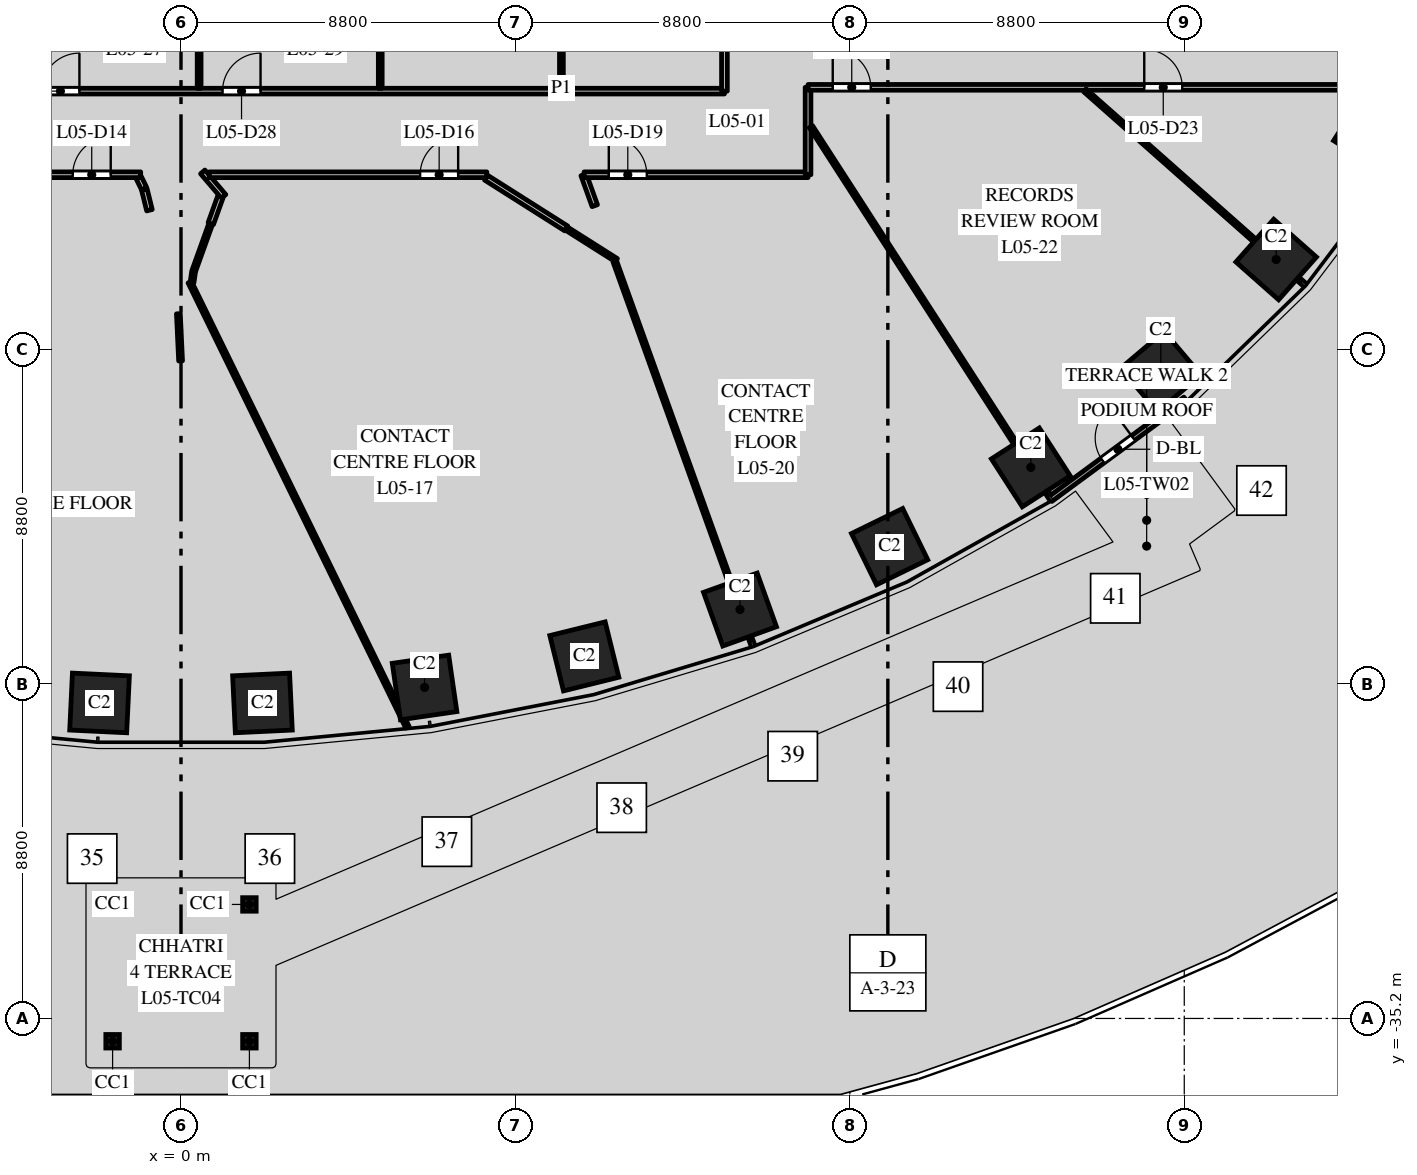
"""IFC4 building model, lengths in metres.
Left out: names, types, materials, properties, quantities, classifications, styles, units other than length and angle.
Written with IfcOpenShell. Run it as: python <this file> out.ifc"""

import sys

from ifc_helpers import new_model, si_unit, direction, frame, frame_2d, origin, origin_2d, place, context, subcontext, project, spatial, rectangle, hollow_circle, extrude, element, fill, save


model = new_model("IFC4")
c1 = context("Model", 3, precision=1e-05, world=origin(), true_north=direction((0.0, 1.0)))
c2 = subcontext(c1, "Body", "Model", "MODEL_VIEW")
j1 = project(units=[si_unit("LENGTHUNIT", "METRE"), si_unit("PLANEANGLEUNIT", "RADIAN")], contexts=[c1])
p1 = place(None, origin())
s1 = spatial("IfcSite", under=j1, at=p1, CompositionType="ELEMENT")
p2 = place(p1, origin())
s2 = spatial("IfcBuilding", under=s1, at=p2, CompositionType="ELEMENT")
p3 = place(p2, frame((0.0, 0.0, 30.5)))
s3 = spatial("IfcBuildingStorey", under=s2, at=p3, CompositionType="ELEMENT", Elevation=30.5)
for number, where, z_axis, x_axis in (
    (1, (-2.143, -26.898, 0.0), (0.0, 0.0, 1.0), (0.999, -0.048, 0.0)),
    (2, (2.143, -26.898, 0.0), (0.0, 0.0, 1.0), (0.999, 0.048, 0.0)),
    (3, (6.409, -26.491, 0.0), (0.0, 0.0, 1.0), (0.99, 0.143, 0.0)),
    (4, (10.613, -25.674, 0.0), (0.0, 0.0, 1.0), (0.971, 0.24, 0.0)),
    (5, (14.709, -24.441, 0.0), (0.0, 0.0, 1.0), (0.941, 0.338, 0.0)),
    (6, (18.646, -22.785, 0.0), (0.0, 0.0, 1.0), (0.898, 0.439, 0.0)),
    (7, (22.362, -20.7, 0.0), (0.0, 0.0, 1.0), (0.84, 0.542, 0.0)),
    (8, (25.783, -18.18, 0.0), (0.0, 0.0, 1.0), (0.763, 0.646, 0.0)),
    (9, (28.819, -15.23, 0.0), (0.0, 0.0, 1.0), (0.663, 0.749, 0.0)),
    (10, (31.365, -11.871, 0.0), (0.0, 0.0, 1.0), (0.535, 0.845, 0.0)),
):
    element("IfcColumn", number, at=place(p3, frame(where, z_axis=z_axis, x_axis=x_axis)), inside=s3, PredefinedType="COLUMN", context=c2, shape_type="SweptSolid", body=[
        extrude(rectangle(XDim=1.5, YDim=1.5, at=origin_2d()), origin(), (0.0, 0.0, 1.0), 4.0),
    ])
p4 = place(p3, frame((22.872, -21.535, 0.0), z_axis=(0.0, 0.0, 1.0), x_axis=(0.805154287598, 0.593065403782, 0.0)))
e11 = element("IfcWall", 11, at=p4, inside=s3, PredefinedType="STANDARD", context=c2, shape_type="SweptSolid", body=[
    extrude(rectangle(XDim=4.425, YDim=0.15, at=frame_2d((2.212, 0.0))), origin(), (0.0, 0.0, 1.0), 3.7),
])
p5 = place(p4, frame((1.712, 0.0, 0.0)))
e12 = element("IfcOpeningElement", 12, at=p5, cuts=e11, PredefinedType="OPENING", context=c2, shape_type="SweptSolid", body=[
    extrude(rectangle(XDim=1.0, YDim=2.4, at=frame_2d((0.5, 1.2))), frame((0.0, 0.085, 0.0), z_axis=(0.0, -1.0, 0.0), x_axis=(1.0, 0.0, 0.0)), (0.0, 0.0, 1.0), 0.17),
])
for number, where, z_axis, x_axis in (
    (13, (-1.8, -35.8, 0.45), (0.0, 0.0, 1.0), (1.0, 0.0, 0.0)),
    (14, (1.8, -35.8, 0.45), (0.0, 0.0, 1.0), (1.0, 0.0, 0.0)),
    (15, (1.8, -32.2, 0.45), (0.0, 0.0, 1.0), (1.0, 0.0, 0.0)),
    (16, (-1.8, -32.2, 0.45), (0.0, 0.0, 1.0), (1.0, 0.0, 0.0)),
):
    element("IfcColumn", number, at=place(p3, frame(where, z_axis=z_axis, x_axis=x_axis)), inside=s3, PredefinedType="COLUMN", context=c2, shape_type="SweptSolid", body=[
        extrude(hollow_circle(Radius=0.178, WallThickness=0.016, at=origin_2d()), origin(), (0.0, 0.0, 1.0), 3.55),
    ])
p6 = place(p3, frame((-14.3, -10.8, 0.0), z_axis=(0.0, 0.0, 1.0), x_axis=(1.0, 0.0, 0.0)))
e17 = element("IfcWall", 17, at=p6, inside=s3, PredefinedType="PARTITIONING", context=c2, shape_type="SweptSolid", body=[
    extrude(rectangle(XDim=28.6, YDim=0.15, at=frame_2d((14.3, 0.0))), origin(), (0.0, 0.0, 1.0), 2.85),
])
p7 = place(p6, frame((10.627, 0.0, 0.0)))
e18 = element("IfcOpeningElement", 18, at=p7, cuts=e17, PredefinedType="OPENING", context=c2, shape_type="SweptSolid", body=[
    extrude(rectangle(XDim=1.0, YDim=2.1, at=frame_2d((0.5, 1.05))), frame((0.0, 0.085, 0.0), z_axis=(0.0, -1.0, 0.0), x_axis=(1.0, 0.0, 0.0)), (0.0, 0.0, 1.0), 0.17),
])
p8 = place(p6, frame((15.393, 0.0, 0.0)))
e19 = element("IfcOpeningElement", 19, at=p8, cuts=e17, PredefinedType="OPENING", context=c2, shape_type="SweptSolid", body=[
    extrude(rectangle(XDim=1.0, YDim=2.1, at=frame_2d((0.5, 1.05))), frame((0.0, 0.085, 0.0), z_axis=(0.0, -1.0, 0.0), x_axis=(1.0, 0.0, 0.0)), (0.0, 0.0, 1.0), 0.17),
])
p9 = place(p3, frame((-7.483, -13.0, 0.0), z_axis=(0.0, 0.0, 1.0), x_axis=(1.0, 0.0, 0.0)))
e20 = element("IfcWall", 20, at=p9, inside=s3, PredefinedType="PARTITIONING", context=c2, shape_type="SweptSolid", body=[
    extrude(rectangle(XDim=6.422, YDim=0.15, at=frame_2d((3.211, 0.0))), origin(), (0.0, 0.0, 1.0), 2.85),
])
p10 = place(p9, frame((4.634, 0.0, 0.0)))
e21 = element("IfcOpeningElement", 21, at=p10, cuts=e20, PredefinedType="OPENING", context=c2, shape_type="SweptSolid", body=[
    extrude(rectangle(XDim=1.0, YDim=2.1, at=frame_2d((0.5, 1.05))), frame((0.0, 0.085, 0.0), z_axis=(0.0, -1.0, 0.0), x_axis=(1.0, 0.0, 0.0)), (0.0, 0.0, 1.0), 0.17),
])
p11 = place(p3, frame((-1.111, -13.079, 0.0), z_axis=(0.0, 0.0, 1.0), x_axis=(0.440240923942, -0.897879685084, 0.0)))
e22 = element("IfcWall", 22, at=p11, inside=s3, PredefinedType="PARTITIONING", context=c2, shape_type="SweptSolid", body=[
    extrude(rectangle(XDim=0.323, YDim=0.15, at=frame_2d((0.161, 0.0))), origin(), (0.0, 0.0, 1.0), 2.85),
])
p12 = place(p3, frame((-0.965, -13.386, 0.0), z_axis=(0.0, 0.0, 1.0), x_axis=(0.239578315167, -0.970877042113, 0.0)))
e23 = element("IfcWall", 23, at=p12, inside=s3, PredefinedType="PARTITIONING", context=c2, shape_type="SweptSolid", body=[
    extrude(rectangle(XDim=0.563, YDim=0.15, at=frame_2d((0.282, 0.0))), origin(), (0.0, 0.0, 1.0), 2.85),
])
p13 = place(p3, frame((-0.069, -16.658, 0.0), z_axis=(0.0, 0.0, 1.0), x_axis=(0.047263912187, -0.998882436829, 0.0)))
e24 = element("IfcWall", 24, at=p13, inside=s3, PredefinedType="PARTITIONING", context=c2, shape_type="SweptSolid", body=[
    extrude(rectangle(XDim=0.424, YDim=0.1, at=frame_2d((0.212, 0.0))), origin(), (0.0, 0.0, 1.0), 3.7),
])
p14 = place(p3, frame((-0.048, -17.108, 0.0), z_axis=(0.0, 0.0, 1.0), x_axis=(0.046977779105, -0.998895934655, 0.0)))
e25 = element("IfcWall", 25, at=p14, inside=s3, PredefinedType="PARTITIONING", context=c2, shape_type="SweptSolid", body=[
    extrude(rectangle(XDim=0.79, YDim=0.1, at=frame_2d((0.395, 0.0))), origin(), (0.0, 0.0, 1.0), 3.7),
])
p15 = place(p3, frame((0.231, -15.824, 0.0), z_axis=(0.0, 0.0, 1.0), x_axis=(0.439219534853, -0.89837976391, 0.0)))
e26 = element("IfcWall", 26, at=p15, inside=s3, PredefinedType="PARTITIONING", context=c2, shape_type="SweptSolid", body=[
    extrude(rectangle(XDim=13.039, YDim=0.1, at=frame_2d((6.52, 0.0))), origin(), (0.0, 0.0, 1.0), 2.85),
])
p16 = place(p3, frame((0.291, -15.832, 0.0), z_axis=(0.0, 0.0, 1.0), x_axis=(0.141883286424, 0.989883393655, 0.0)))
e27 = element("IfcWall", 27, at=p16, inside=s3, PredefinedType="PARTITIONING", context=c2, shape_type="SweptSolid", body=[
    extrude(rectangle(XDim=0.296, YDim=0.1, at=frame_2d((0.148, 0.0))), origin(), (0.0, 0.0, 1.0), 3.7),
])
p17 = place(p3, frame((0.34, -15.521, 0.0), z_axis=(0.0, 0.0, 1.0), x_axis=(0.338162451205, 0.941087751804, 0.0)))
e28 = element("IfcWall", 28, at=p17, inside=s3, PredefinedType="PARTITIONING", context=c2, shape_type="SweptSolid", body=[
    extrude(rectangle(XDim=1.304, YDim=0.1, at=frame_2d((0.652, 0.0))), origin(), (0.0, 0.0, 1.0), 3.7),
])
p18 = place(p3, frame((0.477, -10.725, 0.0), z_axis=(0.0, 0.0, 1.0), x_axis=(0.0, 1.0, 0.0)))
e29 = element("IfcWall", 29, at=p18, inside=s3, PredefinedType="PARTITIONING", context=c2, shape_type="SweptSolid", body=[
    extrude(rectangle(XDim=3.257, YDim=0.1, at=frame_2d((1.628, 0.0))), origin(), (0.0, 0.0, 1.0), 2.85),
])
p19 = place(p3, frame((0.572, -12.925, 0.0), z_axis=(0.0, 0.0, 1.0), x_axis=(0.648868148451, -0.760900864717, 0.0)))
e30 = element("IfcWall", 30, at=p19, inside=s3, PredefinedType="PARTITIONING", context=c2, shape_type="SweptSolid", body=[
    extrude(rectangle(XDim=0.848, YDim=0.15, at=frame_2d((0.424, 0.0))), origin(), (0.0, 0.0, 1.0), 3.7),
])
p20 = place(p3, frame((0.742, -13.0, 0.0), z_axis=(0.0, 0.0, 1.0), x_axis=(1.0, 0.0, 0.0)))
e31 = element("IfcWall", 31, at=p20, inside=s3, PredefinedType="PARTITIONING", context=c2, shape_type="SweptSolid", body=[
    extrude(rectangle(XDim=7.305, YDim=0.15, at=frame_2d((3.653, 0.0))), origin(), (0.0, 0.0, 1.0), 2.85),
])
p21 = place(p20, frame((5.551, 0.0, 0.0)))
e32 = element("IfcOpeningElement", 32, at=p21, cuts=e31, PredefinedType="OPENING", context=c2, shape_type="SweptSolid", body=[
    extrude(rectangle(XDim=1.0, YDim=2.1, at=frame_2d((0.5, 1.05))), frame((0.0, 0.085, 0.0), z_axis=(0.0, -1.0, 0.0), x_axis=(1.0, 0.0, 0.0)), (0.0, 0.0, 1.0), 0.17),
])
p22 = place(p3, frame((0.784, -14.285, 0.0), z_axis=(0.0, 0.0, 1.0), x_axis=(0.337939421495, 0.941167863561, 0.0)))
e33 = element("IfcWall", 33, at=p22, inside=s3, PredefinedType="PARTITIONING", context=c2, shape_type="SweptSolid", body=[
    extrude(rectangle(XDim=0.743, YDim=0.15, at=frame_2d((0.371, 0.0))), origin(), (0.0, 0.0, 1.0), 3.7),
])
p23 = place(p3, frame((5.243, -10.725, 0.0), z_axis=(0.0, 0.0, 1.0), x_axis=(0.0, 1.0, 0.0)))
e34 = element("IfcWall", 34, at=p23, inside=s3, PredefinedType="PARTITIONING", context=c2, shape_type="SweptSolid", body=[
    extrude(rectangle(XDim=4.666, YDim=0.1, at=frame_2d((2.333, 0.0))), origin(), (0.0, 0.0, 1.0), 2.85),
])
p24 = place(p3, frame((8.028, -13.077, 0.0), z_axis=(0.0, 0.0, 1.0), x_axis=(0.844718865656, -0.53521027457, 0.0)))
e35 = element("IfcWall", 35, at=p24, inside=s3, PredefinedType="PARTITIONING", context=c2, shape_type="SweptSolid", body=[
    extrude(rectangle(XDim=2.497, YDim=0.15, at=frame_2d((1.248, 0.0))), origin(), (0.0, 0.0, 1.0), 3.7),
])
p25 = place(p3, frame((10.01, -10.725, 0.0), z_axis=(0.0, 0.0, 1.0), x_axis=(0.0, 1.0, 0.0)))
e36 = element("IfcWall", 36, at=p25, inside=s3, PredefinedType="PARTITIONING", context=c2, shape_type="SweptSolid", body=[
    extrude(rectangle(XDim=21.45, YDim=0.1, at=frame_2d((10.725, 0.0))), origin(), (0.0, 0.0, 1.0), 2.75),
])
p26 = place(p3, frame((10.137, -14.413, 0.0), z_axis=(0.0, 0.0, 1.0), x_axis=(0.844849680057, -0.535003755228, 0.0)))
e37 = element("IfcWall", 37, at=p26, inside=s3, PredefinedType="PARTITIONING", context=c2, shape_type="SweptSolid", body=[
    extrude(rectangle(XDim=1.562, YDim=0.1, at=frame_2d((0.781, 0.0))), origin(), (0.0, 0.0, 1.0), 3.7),
])
p27 = place(p3, frame((10.595, -13.0, 0.0), z_axis=(0.0, 0.0, 1.0), x_axis=(0.338659506624, -0.940908995904, 0.0)))
e38 = element("IfcWall", 38, at=p27, inside=s3, PredefinedType="PARTITIONING", context=c2, shape_type="SweptSolid", body=[
    extrude(rectangle(XDim=0.865, YDim=0.15, at=frame_2d((0.433, 0.0))), origin(), (0.0, 0.0, 1.0), 3.7),
])
p28 = place(p3, frame((10.607, -13.0, 0.0), z_axis=(0.0, 0.0, 1.0), x_axis=(1.0, 0.0, 0.0)))
e39 = element("IfcWall", 39, at=p28, inside=s3, PredefinedType="PARTITIONING", context=c2, shape_type="SweptSolid", body=[
    extrude(rectangle(XDim=5.893, YDim=0.15, at=frame_2d((2.947, 0.0))), origin(), (0.0, 0.0, 1.0), 3.7),
])
p29 = place(p28, frame((0.65, 0.0, 0.0)))
e40 = element("IfcOpeningElement", 40, at=p29, cuts=e39, PredefinedType="OPENING", context=c2, shape_type="SweptSolid", body=[
    extrude(rectangle(XDim=1.0, YDim=2.1, at=frame_2d((0.5, 1.05))), frame((0.0, 0.085, 0.0), z_axis=(0.0, -1.0, 0.0), x_axis=(1.0, 0.0, 0.0)), (0.0, 0.0, 1.0), 0.17),
])
p30 = place(p3, frame((11.416, -15.282, 0.0), z_axis=(0.0, 0.0, 1.0), x_axis=(0.338364268616, -0.94101520802, 0.0)))
e41 = element("IfcWall", 41, at=p30, inside=s3, PredefinedType="PARTITIONING", context=c2, shape_type="SweptSolid", body=[
    extrude(rectangle(XDim=10.734, YDim=0.1, at=frame_2d((5.367, 0.0))), origin(), (0.0, 0.0, 1.0), 3.7),
])
p31 = place(p3, frame((14.3, -10.8, 0.0), z_axis=(0.0, 0.0, 1.0), x_axis=(0.0, 1.0, 0.0)))
e42 = element("IfcWall", 42, at=p31, inside=s3, PredefinedType="PARTITIONING", context=c2, shape_type="SweptSolid", body=[
    extrude(rectangle(XDim=21.6, YDim=0.15, at=frame_2d((10.8, 0.0))), origin(), (0.0, 0.0, 1.0), 2.75),
])
p32 = place(p31, frame((19.95, 0.0, 0.0)))
e43 = element("IfcOpeningElement", 43, at=p32, cuts=e42, PredefinedType="OPENING", context=c2, shape_type="SweptSolid", body=[
    extrude(rectangle(XDim=1.0, YDim=2.1, at=frame_2d((0.5, 1.05))), frame((0.0, 0.085, 0.0), z_axis=(0.0, -1.0, 0.0), x_axis=(1.0, 0.0, 0.0)), (0.0, 0.0, 1.0), 0.17),
])
p33 = place(p3, frame((16.5, -13.0, 0.0), z_axis=(0.0, 0.0, 1.0), x_axis=(0.0, 1.0, 0.0)))
e44 = element("IfcWall", 44, at=p33, inside=s3, PredefinedType="PARTITIONING", context=c2, shape_type="SweptSolid", body=[
    extrude(rectangle(XDim=2.3, YDim=0.15, at=frame_2d((1.15, 0.0))), origin(), (0.0, 0.0, 1.0), 3.7),
])
p34 = place(p3, frame((16.575, -11.733, 0.0), z_axis=(0.0, 0.0, 1.0), x_axis=(0.54222594427, -0.840232720953, 0.0)))
e45 = element("IfcWall", 45, at=p34, inside=s3, PredefinedType="PARTITIONING", context=c2, shape_type="SweptSolid", body=[
    extrude(rectangle(XDim=11.674, YDim=0.1, at=frame_2d((5.837, 0.0))), origin(), (0.0, 0.0, 1.0), 3.7),
])
p35 = place(p3, frame((16.5, -10.7, 0.0), z_axis=(0.0, 0.0, 1.0), x_axis=(1.0, 0.0, 0.0)))
e46 = element("IfcWall", 46, at=p35, inside=s3, PredefinedType="PARTITIONING", context=c2, shape_type="SweptSolid", body=[
    extrude(rectangle(XDim=15.0, YDim=0.15, at=frame_2d((7.5, 0.0))), origin(), (0.0, 0.0, 1.0), 2.75),
])
p36 = place(p35, frame((0.65, 0.0, 0.0)))
e47 = element("IfcOpeningElement", 47, at=p36, cuts=e46, PredefinedType="OPENING", context=c2, shape_type="SweptSolid", body=[
    extrude(rectangle(XDim=1.0, YDim=2.1, at=frame_2d((0.5, 1.05))), frame((0.0, 0.085, 0.0), z_axis=(0.0, -1.0, 0.0), x_axis=(1.0, 0.0, 0.0)), (0.0, 0.0, 1.0), 0.17),
])
p37 = place(p35, frame((8.847, 0.0, 0.0)))
e48 = element("IfcOpeningElement", 48, at=p37, cuts=e46, PredefinedType="OPENING", context=c2, shape_type="SweptSolid", body=[
    extrude(rectangle(XDim=1.0, YDim=2.1, at=frame_2d((0.5, 1.05))), frame((0.0, 0.085, 0.0), z_axis=(0.0, -1.0, 0.0), x_axis=(1.0, 0.0, 0.0)), (0.0, 0.0, 1.0), 0.17),
])
p38 = place(p3, frame((23.785, -10.778, 0.0), z_axis=(0.0, 0.0, 1.0), x_axis=(0.748985701008, -0.662586160198, 0.0)))
e49 = element("IfcWall", 49, at=p38, inside=s3, PredefinedType="PARTITIONING", context=c2, shape_type="SweptSolid", body=[
    extrude(rectangle(XDim=7.723, YDim=0.1, at=frame_2d((3.861, 0.0))), origin(), (0.0, 0.0, 1.0), 3.7),
])
p39 = place(p5, origin())
e50 = element("IfcDoor", 50, at=p39, inside=s3, OperationType="SINGLE_SWING_RIGHT", PredefinedType="DOOR", context=c2, shape_type="SweptSolid", body=[
    extrude(rectangle(XDim=1.0, YDim=2.4, at=frame_2d((0.5, 1.2))), frame((0.0, 0.025, 0.0), z_axis=(0.0, -1.0, 0.0), x_axis=(1.0, 0.0, 0.0)), (0.0, 0.0, 1.0), 0.05),
])
fill(e12, e50)
p40 = place(p10, origin())
e51 = element("IfcDoor", 51, at=p40, inside=s3, OperationType="SINGLE_SWING_RIGHT", PredefinedType="DOOR", context=c2, shape_type="SweptSolid", body=[
    extrude(rectangle(XDim=1.0, YDim=2.1, at=frame_2d((0.5, 1.05))), frame((0.0, 0.025, 0.0), z_axis=(0.0, -1.0, 0.0), x_axis=(1.0, 0.0, 0.0)), (0.0, 0.0, 1.0), 0.05),
])
fill(e21, e51)
p41 = place(p21, origin())
e52 = element("IfcDoor", 52, at=p41, inside=s3, OperationType="SINGLE_SWING_RIGHT", PredefinedType="DOOR", context=c2, shape_type="SweptSolid", body=[
    extrude(rectangle(XDim=1.0, YDim=2.1, at=frame_2d((0.5, 1.05))), frame((0.0, 0.025, 0.0), z_axis=(0.0, -1.0, 0.0), x_axis=(1.0, 0.0, 0.0)), (0.0, 0.0, 1.0), 0.05),
])
fill(e32, e52)
p42 = place(p29, origin())
e53 = element("IfcDoor", 53, at=p42, inside=s3, OperationType="SINGLE_SWING_LEFT", PredefinedType="DOOR", context=c2, shape_type="SweptSolid", body=[
    extrude(rectangle(XDim=1.0, YDim=2.1, at=frame_2d((0.5, 1.05))), frame((0.0, 0.025, 0.0), z_axis=(0.0, -1.0, 0.0), x_axis=(1.0, 0.0, 0.0)), (0.0, 0.0, 1.0), 0.05),
])
fill(e40, e53)
p43 = place(p36, origin())
e54 = element("IfcDoor", 54, at=p43, inside=s3, OperationType="SINGLE_SWING_LEFT", PredefinedType="DOOR", context=c2, shape_type="SweptSolid", body=[
    extrude(rectangle(XDim=1.0, YDim=2.1, at=frame_2d((0.5, 1.05))), frame((0.0, 0.025, 0.0), z_axis=(0.0, -1.0, 0.0), x_axis=(1.0, 0.0, 0.0)), (0.0, 0.0, 1.0), 0.05),
])
fill(e47, e54)
p44 = place(p37, origin())
e55 = element("IfcDoor", 55, at=p44, inside=s3, OperationType="SINGLE_SWING_LEFT", PredefinedType="DOOR", context=c2, shape_type="SweptSolid", body=[
    extrude(rectangle(XDim=1.0, YDim=2.1, at=frame_2d((0.5, 1.05))), frame((0.0, 0.025, 0.0), z_axis=(0.0, -1.0, 0.0), x_axis=(1.0, 0.0, 0.0)), (0.0, 0.0, 1.0), 0.05),
])
fill(e48, e55)
p45 = place(p7, origin())
e56 = element("IfcDoor", 56, at=p45, inside=s3, OperationType="SINGLE_SWING_RIGHT", PredefinedType="DOOR", context=c2, shape_type="SweptSolid", body=[
    extrude(rectangle(XDim=1.0, YDim=2.1, at=frame_2d((0.5, 1.05))), frame((0.0, 0.025, 0.0), z_axis=(0.0, -1.0, 0.0), x_axis=(1.0, 0.0, 0.0)), (0.0, 0.0, 1.0), 0.05),
])
fill(e18, e56)
p46 = place(p8, origin())
e57 = element("IfcDoor", 57, at=p46, inside=s3, OperationType="SINGLE_SWING_RIGHT", PredefinedType="DOOR", context=c2, shape_type="SweptSolid", body=[
    extrude(rectangle(XDim=1.0, YDim=2.1, at=frame_2d((0.5, 1.05))), frame((0.0, 0.025, 0.0), z_axis=(0.0, -1.0, 0.0), x_axis=(1.0, 0.0, 0.0)), (0.0, 0.0, 1.0), 0.05),
])
fill(e19, e57)
save(model, sys.argv[1])
